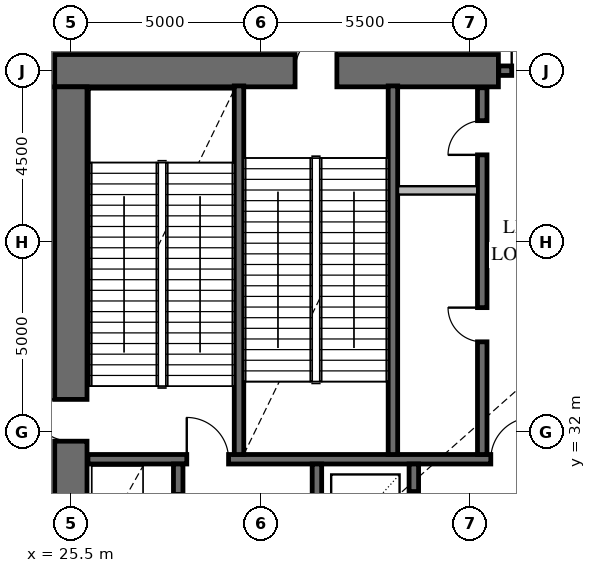
"""IFC4 building model, lengths in metres.
Left out: names, types, materials, properties, quantities, classifications, styles, units other than length and angle.
Written with IfcOpenShell. Run it as: python <this file> out.ifc"""

import sys

from ifc_helpers import new_model, si_unit, direction, frame, frame_2d, origin, place, context, subcontext, project, spatial, rectangle, extrude, element, fill, save


model = new_model("IFC4")
c1 = context("Model", 3, precision=1e-05, world=origin(), true_north=direction((0.0, 1.0)))
c2 = subcontext(c1, "Body", "Model", "MODEL_VIEW")
j1 = project(units=[si_unit("LENGTHUNIT", "METRE"), si_unit("PLANEANGLEUNIT", "RADIAN")], contexts=[c1])
p1 = place(None, origin())
s1 = spatial("IfcSite", under=j1, at=p1, CompositionType="ELEMENT")
p2 = place(p1, origin())
s2 = spatial("IfcBuilding", under=s1, at=p2, CompositionType="ELEMENT")
p3 = place(p2, origin())
s3 = spatial("IfcBuildingStorey", under=s2, at=p3, CompositionType="ELEMENT", Elevation=0.0)
p4 = place(p3, frame((36.75, 41.5, 0.0), z_axis=(0.0, 0.0, 1.0), x_axis=(-1.0, 0.0, 0.0)))
e1 = element("IfcWall", 1, at=p4, inside=s3, PredefinedType="SHEAR", context=c2, shape_type="SweptSolid", body=[
    extrude(rectangle(XDim=11.675, YDim=0.85, at=frame_2d((5.837, 0.0))), origin(), (0.0, 0.0, 1.0), 7.8),
])
p5 = place(p4, frame((4.25, 0.0, 0.0)))
e2 = element("IfcOpeningElement", 2, at=p5, cuts=e1, PredefinedType="OPENING", context=c2, shape_type="SweptSolid", body=[
    extrude(rectangle(XDim=1.1, YDim=2.15, at=frame_2d((0.55, 1.075))), frame((0.0, 0.437, 0.0), z_axis=(0.0, -1.0, 0.0), x_axis=(1.0, 0.0, 0.0)), (0.0, 0.0, 1.0), 0.874),
])
p6 = place(p3, frame((25.5, 22.925, 0.0), z_axis=(0.0, 0.0, 1.0), x_axis=(0.0, 1.0, 0.0)))
e3 = element("IfcWall", 3, at=p6, inside=s3, PredefinedType="SHEAR", context=c2, shape_type="SweptSolid", body=[
    extrude(rectangle(XDim=18.15, YDim=0.85, at=frame_2d((9.075, 0.0))), origin(), (0.0, 0.0, 1.0), 7.8),
])
p7 = place(p6, frame((8.825, 0.0, 0.0)))
e4 = element("IfcOpeningElement", 4, at=p7, cuts=e3, PredefinedType="OPENING", context=c2, shape_type="SweptSolid", body=[
    extrude(rectangle(XDim=1.1, YDim=2.15, at=frame_2d((0.55, 1.075))), frame((0.0, 0.437, 0.0), z_axis=(0.0, -1.0, 0.0), x_axis=(1.0, 0.0, 0.0)), (0.0, 0.0, 1.0), 0.874),
])
p8 = place(p3, frame((25.858, 16.611, 0.0), z_axis=(0.0, 0.0, 1.0), x_axis=(-0.49999847728, 0.866026282926, 0.0)))
e5 = element("IfcWall", 5, at=p8, inside=s3, PredefinedType="SOLIDWALL", context=c2, shape_type="SweptSolid", body=[
    extrude(rectangle(XDim=16.512, YDim=0.3, at=frame_2d((8.256, 0.0))), origin(), (0.0, 0.0, 1.0), 5.95),
])
p9 = place(p8, frame((8.606, 0.0, 0.0)))
e6 = element("IfcOpeningElement", 6, at=p9, cuts=e5, PredefinedType="OPENING", context=c2, shape_type="SweptSolid", body=[
    extrude(rectangle(XDim=2.0, YDim=2.5, at=frame_2d((1.0, 1.25))), frame((0.0, 0.162, 0.0), z_axis=(0.0, -1.0, 0.0), x_axis=(1.0, 0.0, 0.0)), (0.0, 0.0, 1.0), 0.324),
])
p10 = place(p8, frame((7.056, 0.0, 4.5)))
e7 = element("IfcOpeningElement", 7, at=p10, cuts=e5, PredefinedType="OPENING", context=c2, shape_type="SweptSolid", body=[
    extrude(rectangle(XDim=2.4, YDim=1.6, at=frame_2d((1.2, 0.8))), frame((0.0, 0.162, 0.0), z_axis=(0.0, -1.0, 0.0), x_axis=(1.0, 0.0, 0.0)), (0.0, 0.0, 1.0), 0.324),
])
p11 = place(p3, frame((17.602, 33.089, 0.0), z_axis=(0.0, 0.0, 1.0), x_axis=(0.49999847728, 0.866026282926, 0.0)))
e8 = element("IfcWall", 8, at=p11, inside=s3, PredefinedType="SOLIDWALL", context=c2, shape_type="SweptSolid", body=[
    extrude(rectangle(XDim=16.512, YDim=0.3, at=frame_2d((8.256, 0.0))), origin(), (0.0, 0.0, 1.0), 5.95),
])
p12 = place(p11, frame((7.356, 0.0, 0.0)))
e9 = element("IfcOpeningElement", 9, at=p12, cuts=e8, PredefinedType="OPENING", context=c2, shape_type="SweptSolid", body=[
    extrude(rectangle(XDim=1.8, YDim=2.4, at=frame_2d((0.9, 1.2))), frame((0.0, 0.162, 0.0), z_axis=(0.0, -1.0, 0.0), x_axis=(1.0, 0.0, 0.0)), (0.0, 0.0, 1.0), 0.324),
])
p13 = place(p11, frame((7.056, 0.0, 4.5)))
e10 = element("IfcOpeningElement", 10, at=p13, cuts=e8, PredefinedType="OPENING", context=c2, shape_type="SweptSolid", body=[
    extrude(rectangle(XDim=2.4, YDim=1.6, at=frame_2d((1.2, 0.8))), frame((0.0, 0.162, 0.0), z_axis=(0.0, -1.0, 0.0), x_axis=(1.0, 0.0, 0.0)), (0.0, 0.0, 1.0), 0.324),
])
p14 = place(p3, frame((36.76, 41.5, 0.0), z_axis=(0.0, 0.0, 1.0), x_axis=(1.0, 0.0, 0.0)))
e11 = element("IfcWall", 11, at=p14, inside=s3, PredefinedType="SOLIDWALL", context=c2, shape_type="SweptSolid", body=[
    extrude(rectangle(XDim=2.18, YDim=0.25, at=frame_2d((1.09, 0.0))), origin(), (0.0, 0.0, 1.0), 7.8),
])
p15 = place(p14, frame((0.34, 0.0, 0.0)))
e12 = element("IfcOpeningElement", 12, at=p15, cuts=e11, PredefinedType="OPENING", context=c2, shape_type="SweptSolid", body=[
    extrude(rectangle(XDim=1.5, YDim=2.15, at=frame_2d((0.75, 1.075))), frame((0.0, 0.137, 0.0), z_axis=(0.0, -1.0, 0.0), x_axis=(1.0, 0.0, 0.0)), (0.0, 0.0, 1.0), 0.274),
])
p16 = place(p3, frame((25.95, 31.275, 0.0), z_axis=(0.0, 0.0, 1.0), x_axis=(1.0, 0.0, 0.0)))
e13 = element("IfcWall", 13, at=p16, inside=s3, PredefinedType="SOLIDWALL", context=c2, shape_type="SweptSolid", body=[
    extrude(rectangle(XDim=20.1, YDim=0.25, at=frame_2d((10.05, 0.0))), origin(), (0.0, 0.0, 1.0), 7.8),
])
p17 = place(p16, frame((2.6, 0.0, 0.0)))
e14 = element("IfcOpeningElement", 14, at=p17, cuts=e13, PredefinedType="OPENING", context=c2, shape_type="SweptSolid", body=[
    extrude(rectangle(XDim=1.1, YDim=2.15, at=frame_2d((0.55, 1.075))), frame((0.0, 0.137, 0.0), z_axis=(0.0, -1.0, 0.0), x_axis=(1.0, 0.0, 0.0)), (0.0, 0.0, 1.0), 0.274),
])
p18 = place(p16, frame((10.6, 0.0, 0.0)))
e15 = element("IfcOpeningElement", 15, at=p18, cuts=e13, PredefinedType="OPENING", context=c2, shape_type="SweptSolid", body=[
    extrude(rectangle(XDim=1.1, YDim=2.15, at=frame_2d((0.55, 1.075))), frame((0.0, 0.137, 0.0), z_axis=(0.0, -1.0, 0.0), x_axis=(1.0, 0.0, 0.0)), (0.0, 0.0, 1.0), 0.274),
])
p19 = place(p16, frame((16.35, 0.0, 0.0)))
e16 = element("IfcOpeningElement", 16, at=p19, cuts=e13, PredefinedType="OPENING", context=c2, shape_type="SweptSolid", body=[
    extrude(rectangle(XDim=1.1, YDim=2.15, at=frame_2d((0.55, 1.075))), frame((0.0, 0.137, 0.0), z_axis=(0.0, -1.0, 0.0), x_axis=(1.0, 0.0, 0.0)), (0.0, 0.0, 1.0), 0.274),
])
for number, where, z_axis, x_axis in (
    (17, (29.925, 31.4, 0.0), (0.0, 0.0, 1.0), (0.0, 1.0, 0.0)),
    (18, (33.975, 31.4, 0.0), (0.0, 0.0, 1.0), (0.0, 1.0, 0.0)),
):
    element("IfcWall", number, at=place(p3, frame(where, z_axis=z_axis, x_axis=x_axis)), inside=s3, PredefinedType="SOLIDWALL", context=c2, shape_type="SweptSolid", body=[
        extrude(rectangle(XDim=9.7, YDim=0.25, at=frame_2d((4.85, 0.0))), origin(), (0.0, 0.0, 1.0), 7.8),
    ])
p20 = place(p3, frame((36.325, 31.4, 0.0), z_axis=(0.0, 0.0, 1.0), x_axis=(0.0, 1.0, 0.0)))
e19 = element("IfcWall", 19, at=p20, inside=s3, PredefinedType="SOLIDWALL", context=c2, shape_type="SweptSolid", body=[
    extrude(rectangle(XDim=9.65, YDim=0.25, at=frame_2d((4.825, 0.0))), origin(), (0.0, 0.0, 1.0), 7.8),
])
p21 = place(p20, frame((2.965, 0.0, 0.0)))
e20 = element("IfcOpeningElement", 20, at=p21, cuts=e19, PredefinedType="OPENING", context=c2, shape_type="SweptSolid", body=[
    extrude(rectangle(XDim=0.9, YDim=2.1, at=frame_2d((0.45, 1.05))), frame((0.0, 0.137, 0.0), z_axis=(0.0, -1.0, 0.0), x_axis=(1.0, 0.0, 0.0)), (0.0, 0.0, 1.0), 0.274),
])
p22 = place(p20, frame((7.885, 0.0, 0.0)))
e21 = element("IfcOpeningElement", 21, at=p22, cuts=e19, PredefinedType="OPENING", context=c2, shape_type="SweptSolid", body=[
    extrude(rectangle(XDim=0.9, YDim=2.1, at=frame_2d((0.45, 1.05))), frame((0.0, 0.137, 0.0), z_axis=(0.0, -1.0, 0.0), x_axis=(1.0, 0.0, 0.0)), (0.0, 0.0, 1.0), 0.274),
])
p23 = place(p3, frame((28.325, 22.95, 0.0), z_axis=(0.0, 0.0, 1.0), x_axis=(0.0, 1.0, 0.0)))
e22 = element("IfcWall", 22, at=p23, inside=s3, PredefinedType="SOLIDWALL", context=c2, shape_type="SweptSolid", body=[
    extrude(rectangle(XDim=8.2, YDim=0.25, at=frame_2d((4.1, 0.0))), origin(), (0.0, 0.0, 1.0), 7.8),
])
p24 = place(p23, frame((0.75, 0.0, 0.0)))
e23 = element("IfcOpeningElement", 23, at=p24, cuts=e22, PredefinedType="OPENING", context=c2, shape_type="SweptSolid", body=[
    extrude(rectangle(XDim=1.3, YDim=2.3, at=frame_2d((0.65, 1.15))), frame((0.0, 0.137, 0.0), z_axis=(0.0, -1.0, 0.0), x_axis=(1.0, 0.0, 0.0)), (0.0, 0.0, 1.0), 0.274),
])
p25 = place(p23, frame((3.78, 0.0, 0.0)))
e24 = element("IfcOpeningElement", 24, at=p25, cuts=e22, PredefinedType="OPENING", context=c2, shape_type="SweptSolid", body=[
    extrude(rectangle(XDim=0.9, YDim=2.1, at=frame_2d((0.45, 1.05))), frame((0.0, 0.137, 0.0), z_axis=(0.0, -1.0, 0.0), x_axis=(1.0, 0.0, 0.0)), (0.0, 0.0, 1.0), 0.274),
])
p26 = place(p23, frame((6.5, 0.0, 0.0)))
e25 = element("IfcOpeningElement", 25, at=p26, cuts=e22, PredefinedType="OPENING", context=c2, shape_type="SweptSolid", body=[
    extrude(rectangle(XDim=0.9, YDim=2.1, at=frame_2d((0.45, 1.05))), frame((0.0, 0.137, 0.0), z_axis=(0.0, -1.0, 0.0), x_axis=(1.0, 0.0, 0.0)), (0.0, 0.0, 1.0), 0.274),
])
p27 = place(p3, frame((31.975, 22.95, 0.0), z_axis=(0.0, 0.0, 1.0), x_axis=(0.0, 1.0, 0.0)))
e26 = element("IfcWall", 26, at=p27, inside=s3, PredefinedType="SOLIDWALL", context=c2, shape_type="SweptSolid", body=[
    extrude(rectangle(XDim=8.2, YDim=0.25, at=frame_2d((4.1, 0.0))), origin(), (0.0, 0.0, 1.0), 7.8),
])
p28 = place(p3, frame((34.525, 22.95, 0.0), z_axis=(0.0, 0.0, 1.0), x_axis=(0.0, 1.0, 0.0)))
e27 = element("IfcWall", 27, at=p28, inside=s3, PredefinedType="SOLIDWALL", context=c2, shape_type="SweptSolid", body=[
    extrude(rectangle(XDim=8.2, YDim=0.25, at=frame_2d((4.1, 0.0))), origin(), (0.0, 0.0, 1.0), 7.8),
])
p29 = place(p28, frame((0.775, 0.0, 0.0)))
e28 = element("IfcOpeningElement", 28, at=p29, cuts=e27, PredefinedType="OPENING", context=c2, shape_type="SweptSolid", body=[
    extrude(rectangle(XDim=1.1, YDim=2.2, at=frame_2d((0.55, 1.1))), frame((0.0, 0.137, 0.0), z_axis=(0.0, -1.0, 0.0), x_axis=(1.0, 0.0, 0.0)), (0.0, 0.0, 1.0), 0.274),
])
p30 = place(p28, frame((3.575, 0.0, 0.0)))
e29 = element("IfcOpeningElement", 29, at=p30, cuts=e27, PredefinedType="OPENING", context=c2, shape_type="SweptSolid", body=[
    extrude(rectangle(XDim=1.1, YDim=2.2, at=frame_2d((0.55, 1.1))), frame((0.0, 0.137, 0.0), z_axis=(0.0, -1.0, 0.0), x_axis=(1.0, 0.0, 0.0)), (0.0, 0.0, 1.0), 0.274),
])
p31 = place(p28, frame((6.375, 0.0, 0.0)))
e30 = element("IfcOpeningElement", 30, at=p31, cuts=e27, PredefinedType="OPENING", context=c2, shape_type="SweptSolid", body=[
    extrude(rectangle(XDim=1.1, YDim=2.2, at=frame_2d((0.55, 1.1))), frame((0.0, 0.137, 0.0), z_axis=(0.0, -1.0, 0.0), x_axis=(1.0, 0.0, 0.0)), (0.0, 0.0, 1.0), 0.274),
])
p32 = place(p3, frame((34.108, 38.35, 0.0), z_axis=(0.0, 0.0, 1.0), x_axis=(1.0, 0.0, 0.0)))
e31 = element("IfcWall", 31, at=p32, inside=s3, PredefinedType="PARTITIONING", context=c2, shape_type="SweptSolid", body=[
    extrude(rectangle(XDim=2.084, YDim=0.22, at=frame_2d((1.042, 0.0))), origin(), (0.0, 0.0, 1.0), 7.35),
])
p33 = place(p7, origin())
e32 = element("IfcDoor", 32, at=p33, inside=s3, OperationType="SINGLE_SWING_RIGHT", PredefinedType="USERDEFINED", context=c2, shape_type="SweptSolid", body=[
    extrude(rectangle(XDim=1.1, YDim=2.15, at=frame_2d((0.55, 1.075))), frame((0.0, 0.025, 0.0), z_axis=(0.0, -1.0, 0.0), x_axis=(1.0, 0.0, 0.0)), (0.0, 0.0, 1.0), 0.05),
])
fill(e4, e32)
p34 = place(p5, frame((1.1, 0.0, 0.0), z_axis=(0.0, 0.0, 1.0), x_axis=(-1.0, 0.0, 0.0)))
e33 = element("IfcDoor", 33, at=p34, inside=s3, OperationType="SINGLE_SWING_RIGHT", PredefinedType="USERDEFINED", context=c2, shape_type="SweptSolid", body=[
    extrude(rectangle(XDim=1.1, YDim=2.15, at=frame_2d((0.55, 1.075))), frame((0.0, 0.025, 0.0), z_axis=(0.0, -1.0, 0.0), x_axis=(1.0, 0.0, 0.0)), (0.0, 0.0, 1.0), 0.05),
])
fill(e2, e33)
p35 = place(p15, origin())
e34 = element("IfcDoor", 34, at=p35, inside=s3, OperationType="DOUBLE_DOOR_SINGLE_SWING", PredefinedType="DOOR", context=c2, shape_type="SweptSolid", body=[
    extrude(rectangle(XDim=1.5, YDim=2.15, at=frame_2d((0.75, 1.075))), frame((0.0, 0.025, 0.0), z_axis=(0.0, -1.0, 0.0), x_axis=(1.0, 0.0, 0.0)), (0.0, 0.0, 1.0), 0.05),
])
fill(e12, e34)
p36 = place(p17, origin())
e35 = element("IfcDoor", 35, at=p36, inside=s3, OperationType="SINGLE_SWING_LEFT", PredefinedType="USERDEFINED", context=c2, shape_type="SweptSolid", body=[
    extrude(rectangle(XDim=1.1, YDim=2.15, at=frame_2d((0.55, 1.075))), frame((0.0, 0.025, 0.0), z_axis=(0.0, -1.0, 0.0), x_axis=(1.0, 0.0, 0.0)), (0.0, 0.0, 1.0), 0.05),
])
fill(e14, e35)
p37 = place(p18, origin())
e36 = element("IfcDoor", 36, at=p37, inside=s3, OperationType="SINGLE_SWING_RIGHT", PredefinedType="USERDEFINED", context=c2, shape_type="SweptSolid", body=[
    extrude(rectangle(XDim=1.1, YDim=2.15, at=frame_2d((0.55, 1.075))), frame((0.0, 0.025, 0.0), z_axis=(0.0, -1.0, 0.0), x_axis=(1.0, 0.0, 0.0)), (0.0, 0.0, 1.0), 0.05),
])
fill(e15, e36)
p38 = place(p21, origin())
e37 = element("IfcDoor", 37, at=p38, inside=s3, OperationType="SINGLE_SWING_RIGHT", PredefinedType="DOOR", context=c2, shape_type="SweptSolid", body=[
    extrude(rectangle(XDim=0.9, YDim=2.1, at=frame_2d((0.45, 1.05))), frame((0.0, 0.025, 0.0), z_axis=(0.0, -1.0, 0.0), x_axis=(1.0, 0.0, 0.0)), (0.0, 0.0, 1.0), 0.05),
])
fill(e20, e37)
p39 = place(p22, origin())
e38 = element("IfcDoor", 38, at=p39, inside=s3, OperationType="SINGLE_SWING_LEFT", PredefinedType="DOOR", context=c2, shape_type="SweptSolid", body=[
    extrude(rectangle(XDim=0.9, YDim=2.1, at=frame_2d((0.45, 1.05))), frame((0.0, 0.025, 0.0), z_axis=(0.0, -1.0, 0.0), x_axis=(1.0, 0.0, 0.0)), (0.0, 0.0, 1.0), 0.05),
])
fill(e21, e38)
p40 = place(p31, frame((1.1, 0.0, 0.0), z_axis=(0.0, 0.0, 1.0), x_axis=(-1.0, 0.0, 0.0)))
e39 = element("IfcDoor", 39, at=p40, inside=s3, OperationType="DOUBLE_DOOR_SLIDING", PredefinedType="DOOR", context=c2, shape_type="SweptSolid", body=[
    extrude(rectangle(XDim=1.1, YDim=2.2, at=frame_2d((0.55, 1.1))), frame((0.0, 0.025, 0.0), z_axis=(0.0, -1.0, 0.0), x_axis=(1.0, 0.0, 0.0)), (0.0, 0.0, 1.0), 0.05),
])
fill(e30, e39)
save(model, sys.argv[1])
